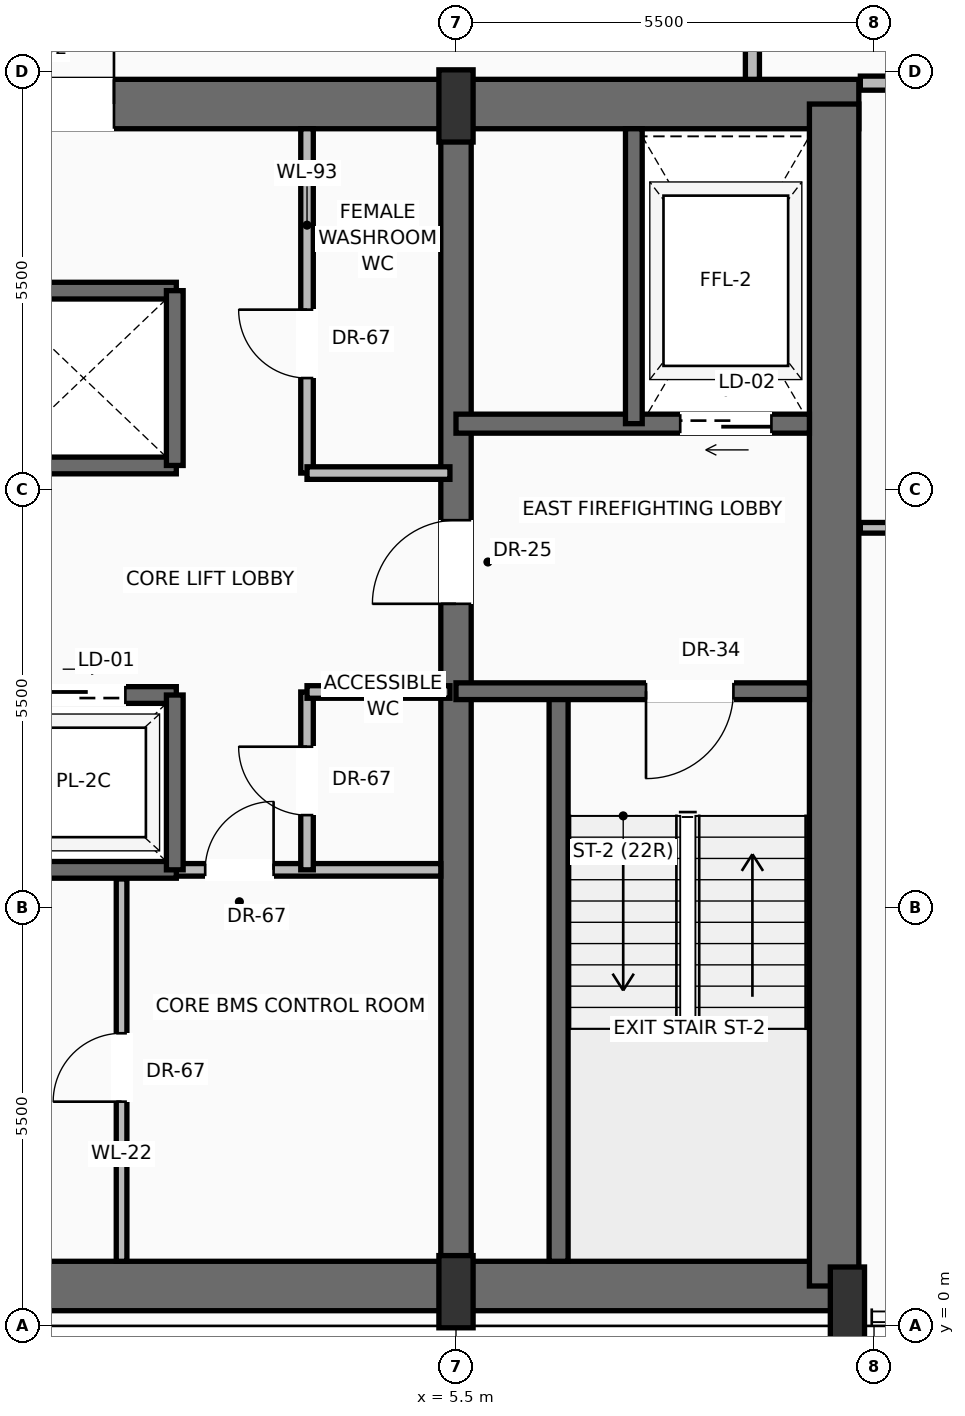
"""IFC4 building model, lengths in metres.
Left out: names, types, materials, properties, quantities, classifications, styles, units other than length and angle.
Written with IfcOpenShell. Run it as: python <this file> out.ifc"""

import sys

from ifc_helpers import new_model, si_unit, direction, frame, frame_2d, origin, origin_2d, place, context, subcontext, project, spatial, rectangle, extrude, source, transform, mapped, element, fill, save


model = new_model("IFC4")
c1 = context("Model", 3, precision=1e-05, world=origin(), true_north=direction((0.0, 1.0)))
c2 = subcontext(c1, "Body", "Model", "MODEL_VIEW")
j1 = project(units=[si_unit("LENGTHUNIT", "METRE"), si_unit("PLANEANGLEUNIT", "RADIAN")], contexts=[c1])
p1 = place(None, origin())
s1 = spatial("IfcSite", under=j1, at=p1, CompositionType="ELEMENT")
p2 = place(p1, origin())
s2 = spatial("IfcBuilding", under=s1, at=p2, CompositionType="ELEMENT")
p3 = place(p2, frame((0.0, 0.0, 147.8)))
s3 = spatial("IfcBuildingStorey", under=s2, at=p3, CompositionType="ELEMENT", Elevation=147.8)
p4 = place(p3, frame((-10.65, 0.525, 0.0), z_axis=(0.0, 0.0, 1.0), x_axis=(1.0, 0.0, 0.0)))
e1 = element("IfcWall", 1, at=p4, inside=s3, PredefinedType="SHEAR", context=c2, shape_type="SweptSolid", body=[
    extrude(rectangle(XDim=21.3, YDim=0.65, at=frame_2d((10.65, 0.0))), origin(), (0.0, 0.0, 1.0), 3.47),
])
p5 = place(p3, frame((-10.8, 16.075, 0.0), z_axis=(0.0, 0.0, 1.0), x_axis=(1.0, 0.0, 0.0)))
e2 = element("IfcWall", 2, at=p5, inside=s3, PredefinedType="SHEAR", context=c2, shape_type="SweptSolid", body=[
    extrude(rectangle(XDim=21.6, YDim=0.65, at=frame_2d((10.8, 0.0))), origin(), (0.0, 0.0, 1.0), 3.47),
])
p6 = place(p5, frame((3.37, 0.0, 0.0)))
e3 = element("IfcOpeningElement", 3, at=p6, cuts=e2, PredefinedType="OPENING", context=c2, shape_type="SweptSolid", body=[
    extrude(rectangle(XDim=1.3, YDim=2.3, at=frame_2d((0.65, 1.15))), frame((0.0, 0.335, 0.0), z_axis=(0.0, -1.0, 0.0), x_axis=(1.0, 0.0, 0.0)), (0.0, 0.0, 1.0), 0.67),
])
p7 = place(p5, frame((9.8, 0.0, 0.0)))
e4 = element("IfcOpeningElement", 4, at=p7, cuts=e2, PredefinedType="OPENING", context=c2, shape_type="SweptSolid", body=[
    extrude(rectangle(XDim=2.0, YDim=2.4, at=frame_2d((1.0, 1.2))), frame((0.0, 0.335, 0.0), z_axis=(0.0, -1.0, 0.0), x_axis=(1.0, 0.0, 0.0)), (0.0, 0.0, 1.0), 0.67),
])
p8 = place(p3, frame((10.475, 0.525, 0.0), z_axis=(0.0, 0.0, 1.0), x_axis=(0.0, 1.0, 0.0)))
e5 = element("IfcWall", 5, at=p8, inside=s3, PredefinedType="SHEAR", context=c2, shape_type="SweptSolid", body=[
    extrude(rectangle(XDim=15.55, YDim=0.65, at=frame_2d((7.775, 0.0))), origin(), (0.0, 0.0, 1.0), 3.47),
])
p9 = place(p3, frame((5.5, 0.525, 0.0), z_axis=(0.0, 0.0, 1.0), x_axis=(0.0, 1.0, 0.0)))
e6 = element("IfcWall", 6, at=p9, inside=s3, PredefinedType="SHEAR", context=c2, shape_type="SweptSolid", body=[
    extrude(rectangle(XDim=15.55, YDim=0.4, at=frame_2d((7.775, 0.0))), origin(), (0.0, 0.0, 1.0), 3.47),
])
p10 = place(p9, frame((8.975, 0.0, 0.0)))
e7 = element("IfcOpeningElement", 7, at=p10, cuts=e6, PredefinedType="OPENING", context=c2, shape_type="SweptSolid", body=[
    extrude(rectangle(XDim=1.1, YDim=2.2, at=frame_2d((0.55, 1.1))), frame((0.0, 0.21, 0.0), z_axis=(0.0, -1.0, 0.0), x_axis=(1.0, 0.0, 0.0)), (0.0, 0.0, 1.0), 0.42),
])
m1 = source(origin(), c2, "Body", "SweptSolid", [
    extrude(rectangle(XDim=0.45, YDim=0.95, at=origin_2d()), origin(), (0.0, 0.0, 1.0), 3.7),
])
for number, where, z_axis, x_axis in (
    (8, (5.5, 0.45, 0.0), (0.0, 0.0, 1.0), (1.0, 0.0, 0.0)),
    (9, (10.65, 0.3, 0.0), (0.0, 0.0, 1.0), (1.0, 0.0, 0.0)),
    (10, (5.5, 16.05, 0.0), (0.0, 0.0, 1.0), (1.0, 0.0, 0.0)),
):
    element("IfcColumn", number, at=place(p3, frame(where, z_axis=z_axis, x_axis=x_axis)), inside=s3, PredefinedType="PILASTER", context=c2, shape_type="MappedRepresentation", body=[
        mapped(m1, transform((0.0, 0.0, 0.0), scale=1.0)),
    ])
p11 = place(p3, frame((6.85, 0.85, 0.0), z_axis=(0.0, 0.0, 1.0), x_axis=(0.0, 1.0, 0.0)))
e11 = element("IfcWall", 11, at=p11, inside=s3, PredefinedType="SOLIDWALL", context=c2, shape_type="SweptSolid", body=[
    extrude(rectangle(XDim=7.5, YDim=0.25, at=frame_2d((3.75, 0.0))), origin(), (0.0, 0.0, 1.0), 3.47),
])
p12 = place(p3, frame((10.15, 8.35, 0.0), z_axis=(0.0, 0.0, 1.0), x_axis=(-1.0, 0.0, 0.0)))
e12 = element("IfcWall", 12, at=p12, inside=s3, PredefinedType="SOLIDWALL", context=c2, shape_type="SweptSolid", body=[
    extrude(rectangle(XDim=4.65, YDim=0.22, at=frame_2d((2.325, 0.0))), origin(), (0.0, 0.0, 1.0), 3.47),
])
p13 = place(p12, frame((1.0, 0.0, 0.0)))
e13 = element("IfcOpeningElement", 13, at=p13, cuts=e12, PredefinedType="OPENING", context=c2, shape_type="SweptSolid", body=[
    extrude(rectangle(XDim=1.15, YDim=2.2, at=frame_2d((0.575, 1.1))), frame((0.0, 0.12, 0.0), z_axis=(0.0, -1.0, 0.0), x_axis=(1.0, 0.0, 0.0)), (0.0, 0.0, 1.0), 0.24),
])
p14 = place(p3, frame((10.15, 11.87, 0.0), z_axis=(0.0, 0.0, 1.0), x_axis=(-1.0, 0.0, 0.0)))
e14 = element("IfcWall", 14, at=p14, inside=s3, PredefinedType="SOLIDWALL", context=c2, shape_type="SweptSolid", body=[
    extrude(rectangle(XDim=4.65, YDim=0.25, at=frame_2d((2.325, 0.0))), origin(), (0.0, 0.0, 1.0), 3.47),
])
p15 = place(p14, frame((0.5, 0.0, 0.0)))
e15 = element("IfcOpeningElement", 15, at=p15, cuts=e14, PredefinedType="OPENING", context=c2, shape_type="SweptSolid", body=[
    extrude(rectangle(XDim=1.2, YDim=2.25, at=frame_2d((0.6, 1.125))), frame((0.0, 0.135, 0.0), z_axis=(0.0, -1.0, 0.0), x_axis=(1.0, 0.0, 0.0)), (0.0, 0.0, 1.0), 0.27),
])
p16 = place(p3, frame((7.84, 11.87, 0.0), z_axis=(0.0, 0.0, 1.0), x_axis=(0.0, 1.0, 0.0)))
e16 = element("IfcWall", 16, at=p16, inside=s3, PredefinedType="SOLIDWALL", context=c2, shape_type="SweptSolid", body=[
    extrude(rectangle(XDim=3.88, YDim=0.22, at=frame_2d((1.94, 0.0))), origin(), (0.0, 0.0, 1.0), 3.47),
])
p17 = place(p3, frame((1.82, 6.0, 0.0), z_axis=(0.0, 0.0, 1.0), x_axis=(1.0, 0.0, 0.0)))
e17 = element("IfcWall", 17, at=p17, inside=s3, PredefinedType="PARTITIONING", context=c2, shape_type="SweptSolid", body=[
    extrude(rectangle(XDim=3.48, YDim=0.165, at=frame_2d((1.74, 0.0))), origin(), (0.0, 0.0, 1.0), 3.462),
])
p18 = place(p17, frame((0.38, 0.0, 0.0)))
e18 = element("IfcOpeningElement", 18, at=p18, cuts=e17, PredefinedType="OPENING", context=c2, shape_type="SweptSolid", body=[
    extrude(rectangle(XDim=0.9, YDim=2.1, at=frame_2d((0.45, 1.05))), frame((0.0, 0.093, 0.0), z_axis=(0.0, -1.0, 0.0), x_axis=(1.0, 0.0, 0.0)), (0.0, 0.0, 1.0), 0.185),
])
p19 = place(p3, frame((1.1, 0.85, 0.0), z_axis=(0.0, 0.0, 1.0), x_axis=(0.0, 1.0, 0.0)))
e19 = element("IfcWall", 19, at=p19, inside=s3, PredefinedType="PARTITIONING", context=c2, shape_type="SweptSolid", body=[
    extrude(rectangle(XDim=5.03, YDim=0.14, at=frame_2d((2.515, 0.0))), origin(), (0.0, 0.0, 1.0), 3.462),
])
p20 = place(p19, frame((2.1, 0.0, 0.0)))
e20 = element("IfcOpeningElement", 20, at=p20, cuts=e19, PredefinedType="OPENING", context=c2, shape_type="SweptSolid", body=[
    extrude(rectangle(XDim=0.9, YDim=2.1, at=frame_2d((0.45, 1.05))), frame((0.0, 0.08, 0.0), z_axis=(0.0, -1.0, 0.0), x_axis=(1.0, 0.0, 0.0)), (0.0, 0.0, 1.0), 0.16),
])
p21 = place(p3, frame((3.54, 6.0, 0.0), z_axis=(0.0, 0.0, 1.0), x_axis=(0.0, 1.0, 0.0)))
e21 = element("IfcWall", 21, at=p21, inside=s3, PredefinedType="PARTITIONING", context=c2, shape_type="SweptSolid", body=[
    extrude(rectangle(XDim=2.34, YDim=0.165, at=frame_2d((1.17, 0.0))), origin(), (0.0, 0.0, 1.0), 3.462),
])
p22 = place(p21, frame((0.72, 0.0, 0.0)))
e22 = element("IfcOpeningElement", 22, at=p22, cuts=e21, PredefinedType="OPENING", context=c2, shape_type="SweptSolid", body=[
    extrude(rectangle(XDim=0.9, YDim=2.1, at=frame_2d((0.45, 1.05))), frame((0.0, 0.093, 0.0), z_axis=(0.0, -1.0, 0.0), x_axis=(1.0, 0.0, 0.0)), (0.0, 0.0, 1.0), 0.185),
])
p23 = place(p3, frame((3.54, 8.34, 0.0), z_axis=(0.0, 0.0, 1.0), x_axis=(1.0, 0.0, 0.0)))
e23 = element("IfcWall", 23, at=p23, inside=s3, PredefinedType="PARTITIONING", context=c2, shape_type="SweptSolid", body=[
    extrude(rectangle(XDim=1.88, YDim=0.165, at=frame_2d((0.94, 0.0))), origin(), (0.0, 0.0, 1.0), 3.462),
])
p24 = place(p3, frame((-5.5, 6.0, 0.0), z_axis=(0.0, 0.0, 1.0), x_axis=(1.0, 0.0, 0.0)))
e24 = element("IfcWall", 24, at=p24, inside=s3, PredefinedType="SOLIDWALL", context=c2, shape_type="SweptSolid", body=[
    extrude(rectangle(XDim=7.32, YDim=0.22, at=frame_2d((3.66, 0.0))), origin(), (0.0, 0.0, 1.0), 3.47),
])
p25 = place(p3, frame((-5.5, 8.3, 0.0), z_axis=(0.0, 0.0, 1.0), x_axis=(1.0, 0.0, 0.0)))
e25 = element("IfcWall", 25, at=p25, inside=s3, PredefinedType="SOLIDWALL", context=c2, shape_type="SweptSolid", body=[
    extrude(rectangle(XDim=7.32, YDim=0.22, at=frame_2d((3.66, 0.0))), origin(), (0.0, 0.0, 1.0), 3.47),
])
p26 = place(p25, frame((0.75, 0.0, 0.0)))
e26 = element("IfcOpeningElement", 26, at=p26, cuts=e25, PredefinedType="OPENING", context=c2, shape_type="SweptSolid", body=[
    extrude(rectangle(XDim=1.1, YDim=2.2, at=frame_2d((0.55, 1.1))), frame((0.0, 0.12, 0.0), z_axis=(0.0, -1.0, 0.0), x_axis=(1.0, 0.0, 0.0)), (0.0, 0.0, 1.0), 0.24),
])
p27 = place(p25, frame((3.15, 0.0, 0.0)))
e27 = element("IfcOpeningElement", 27, at=p27, cuts=e25, PredefinedType="OPENING", context=c2, shape_type="SweptSolid", body=[
    extrude(rectangle(XDim=1.1, YDim=2.2, at=frame_2d((0.55, 1.1))), frame((0.0, 0.12, 0.0), z_axis=(0.0, -1.0, 0.0), x_axis=(1.0, 0.0, 0.0)), (0.0, 0.0, 1.0), 0.24),
])
p28 = place(p25, frame((5.55, 0.0, 0.0)))
e28 = element("IfcOpeningElement", 28, at=p28, cuts=e25, PredefinedType="OPENING", context=c2, shape_type="SweptSolid", body=[
    extrude(rectangle(XDim=1.1, YDim=2.2, at=frame_2d((0.55, 1.1))), frame((0.0, 0.12, 0.0), z_axis=(0.0, -1.0, 0.0), x_axis=(1.0, 0.0, 0.0)), (0.0, 0.0, 1.0), 0.24),
])
p29 = place(p3, frame((1.8, 6.0, 0.0), z_axis=(0.0, 0.0, 1.0), x_axis=(0.0, 1.0, 0.0)))
e29 = element("IfcWall", 29, at=p29, inside=s3, PredefinedType="SOLIDWALL", context=c2, shape_type="SweptSolid", body=[
    extrude(rectangle(XDim=2.3, YDim=0.22, at=frame_2d((1.15, 0.0))), origin(), (0.0, 0.0, 1.0), 3.47),
])
for number, where, z_axis, x_axis in (
    (30, (-5.5, 11.32, 0.0), (0.0, 0.0, 1.0), (1.0, 0.0, 0.0)),
    (31, (-5.5, 13.62, 0.0), (0.0, 0.0, 1.0), (1.0, 0.0, 0.0)),
):
    element("IfcWall", number, at=place(p3, frame(where, z_axis=z_axis, x_axis=x_axis)), inside=s3, PredefinedType="SOLIDWALL", context=c2, shape_type="SweptSolid", body=[
        extrude(rectangle(XDim=7.32, YDim=0.22, at=frame_2d((3.66, 0.0))), origin(), (0.0, 0.0, 1.0), 3.47),
    ])
p30 = place(p3, frame((1.8, 11.32, 0.0), z_axis=(0.0, 0.0, 1.0), x_axis=(0.0, 1.0, 0.0)))
e32 = element("IfcWall", 32, at=p30, inside=s3, PredefinedType="SOLIDWALL", context=c2, shape_type="SweptSolid", body=[
    extrude(rectangle(XDim=2.3, YDim=0.22, at=frame_2d((1.15, 0.0))), origin(), (0.0, 0.0, 1.0), 3.47),
])
p31 = place(p3, frame((3.54, 11.22, 0.0), z_axis=(0.0, 0.0, 1.0), x_axis=(0.0, 1.0, 0.0)))
e33 = element("IfcWall", 33, at=p31, inside=s3, PredefinedType="PARTITIONING", context=c2, shape_type="SweptSolid", body=[
    extrude(rectangle(XDim=4.53, YDim=0.165, at=frame_2d((2.265, 0.0))), origin(), (0.0, 0.0, 1.0), 3.462),
])
p32 = place(p31, frame((1.25, 0.0, 0.0)))
e34 = element("IfcOpeningElement", 34, at=p32, cuts=e33, PredefinedType="OPENING", context=c2, shape_type="SweptSolid", body=[
    extrude(rectangle(XDim=0.9, YDim=2.1, at=frame_2d((0.45, 1.05))), frame((0.0, 0.093, 0.0), z_axis=(0.0, -1.0, 0.0), x_axis=(1.0, 0.0, 0.0)), (0.0, 0.0, 1.0), 0.185),
])
p33 = place(p3, frame((3.54, 11.22, 0.0), z_axis=(0.0, 0.0, 1.0), x_axis=(1.0, 0.0, 0.0)))
e35 = element("IfcWall", 35, at=p33, inside=s3, PredefinedType="PARTITIONING", context=c2, shape_type="SweptSolid", body=[
    extrude(rectangle(XDim=1.88, YDim=0.165, at=frame_2d((0.94, 0.0))), origin(), (0.0, 0.0, 1.0), 3.462),
])
p34 = place(p3, frame((9.4, 16.4, 0.0), z_axis=(0.0, 0.0, 1.0), x_axis=(0.0, 1.0, 0.0)))
e36 = element("IfcWall", 36, at=p34, inside=s3, PredefinedType="PARTITIONING", context=c2, shape_type="SweptSolid", body=[
    extrude(rectangle(XDim=8.8, YDim=0.185, at=frame_2d((4.4, 0.0))), origin(), (0.0, 0.0, 1.0), 2.846),
])
p35 = place(p34, frame((4.331, 0.0, 0.0)))
e37 = element("IfcOpeningElement", 37, at=p35, cuts=e36, PredefinedType="OPENING", context=c2, shape_type="SweptSolid", body=[
    extrude(rectangle(XDim=0.95, YDim=2.2, at=frame_2d((0.475, 1.1))), frame((0.0, 0.103, 0.0), z_axis=(0.0, -1.0, 0.0), x_axis=(1.0, 0.0, 0.0)), (0.0, 0.0, 1.0), 0.205),
])
p36 = place(p3, frame((10.82, 16.35, 0.0), z_axis=(0.0, 0.0, 1.0), x_axis=(1.0, 0.0, 0.0)))
e38 = element("IfcWall", 38, at=p36, inside=s3, PredefinedType="PARTITIONING", context=c2, shape_type="SweptSolid", body=[
    extrude(rectangle(XDim=10.813, YDim=0.185, at=frame_2d((5.406, 0.0))), origin(), (0.0, 0.0, 1.0), 3.462),
])
p37 = place(p36, frame((3.412, 0.0, 0.0)))
e39 = element("IfcOpeningElement", 39, at=p37, cuts=e38, PredefinedType="OPENING", context=c2, shape_type="SweptSolid", body=[
    extrude(rectangle(XDim=0.95, YDim=2.2, at=frame_2d((0.475, 1.1))), frame((0.0, 0.103, 0.0), z_axis=(0.0, -1.0, 0.0), x_axis=(1.0, 0.0, 0.0)), (0.0, 0.0, 1.0), 0.205),
])
p38 = place(p3, frame((10.82, 10.5, 0.0), z_axis=(0.0, 0.0, 1.0), x_axis=(1.0, 0.0, 0.0)))
e40 = element("IfcWall", 40, at=p38, inside=s3, PredefinedType="PARTITIONING", context=c2, shape_type="SweptSolid", body=[
    extrude(rectangle(XDim=14.536, YDim=0.14, at=frame_2d((7.268, 0.0))), origin(), (0.0, 0.0, 1.0), 3.462),
])
p39 = place(p38, frame((6.785, 0.0, 0.0)))
e41 = element("IfcOpeningElement", 41, at=p39, cuts=e40, PredefinedType="OPENING", context=c2, shape_type="SweptSolid", body=[
    extrude(rectangle(XDim=0.95, YDim=2.2, at=frame_2d((0.475, 1.1))), frame((0.0, 0.08, 0.0), z_axis=(0.0, -1.0, 0.0), x_axis=(1.0, 0.0, 0.0)), (0.0, 0.0, 1.0), 0.16),
])
m2 = source(origin(), c2, "Body", "SweptSolid", [
    extrude(rectangle(XDim=1.15, YDim=2.2, at=frame_2d((0.575, 1.1))), frame((0.0, 0.025, 0.0), z_axis=(0.0, -1.0, 0.0), x_axis=(1.0, 0.0, 0.0)), (0.0, 0.0, 1.0), 0.05),
])
p40 = place(p13, origin())
e42 = element("IfcDoor", 42, at=p40, inside=s3, OperationType="SINGLE_SWING_RIGHT", PredefinedType="DOOR", context=c2, shape_type="MappedRepresentation", body=[
    mapped(m2, transform((0.0, 0.0, 0.0), scale=1.0)),
])
fill(e13, e42)
m3 = source(origin(), c2, "Body", "SweptSolid", [
    extrude(rectangle(XDim=1.1, YDim=2.2, at=frame_2d((0.55, 1.1))), frame((0.0, 0.025, 0.0), z_axis=(0.0, -1.0, 0.0), x_axis=(1.0, 0.0, 0.0)), (0.0, 0.0, 1.0), 0.05),
])
p41 = place(p10, origin())
e43 = element("IfcDoor", 43, at=p41, inside=s3, OperationType="SINGLE_SWING_LEFT", PredefinedType="DOOR", context=c2, shape_type="MappedRepresentation", body=[
    mapped(m3, transform((0.0, 0.0, 0.0), scale=1.0)),
])
fill(e7, e43)
m4 = source(origin(), c2, "Body", "SweptSolid", [
    extrude(rectangle(XDim=1.2, YDim=2.25, at=frame_2d((0.6, 1.125))), frame((0.0, 0.025, 0.0), z_axis=(0.0, -1.0, 0.0), x_axis=(1.0, 0.0, 0.0)), (0.0, 0.0, 1.0), 0.05),
])
p42 = place(p15, origin())
e44 = element("IfcDoor", 44, at=p42, inside=s3, OperationType="SLIDING_TO_RIGHT", PredefinedType="DOOR", context=c2, shape_type="MappedRepresentation", body=[
    mapped(m4, transform((0.0, 0.0, 0.0), scale=1.0)),
])
fill(e15, e44)
m5 = source(origin(), c2, "Body", "SweptSolid", [
    extrude(rectangle(XDim=2.0, YDim=2.4, at=frame_2d((1.0, 1.2))), frame((0.0, 0.025, 0.0), z_axis=(0.0, -1.0, 0.0), x_axis=(1.0, 0.0, 0.0)), (0.0, 0.0, 1.0), 0.05),
])
p43 = place(p7, origin())
e45 = element("IfcDoor", 45, at=p43, inside=s3, OperationType="DOUBLE_DOOR_SINGLE_SWING", PredefinedType="DOOR", context=c2, shape_type="MappedRepresentation", body=[
    mapped(m5, transform((0.0, 0.0, 0.0), scale=1.0)),
])
fill(e4, e45)
m6 = source(origin(), c2, "Body", "SweptSolid", [
    extrude(rectangle(XDim=0.9, YDim=2.1, at=frame_2d((0.45, 1.05))), frame((0.0, 0.025, 0.0), z_axis=(0.0, -1.0, 0.0), x_axis=(1.0, 0.0, 0.0)), (0.0, 0.0, 1.0), 0.05),
])
p44 = place(p18, origin())
e46 = element("IfcDoor", 46, at=p44, inside=s3, OperationType="SINGLE_SWING_RIGHT", PredefinedType="DOOR", context=c2, shape_type="MappedRepresentation", body=[
    mapped(m6, transform((0.0, 0.0, 0.0), scale=1.0)),
])
fill(e18, e46)
p45 = place(p20, origin())
e47 = element("IfcDoor", 47, at=p45, inside=s3, OperationType="SINGLE_SWING_LEFT", PredefinedType="DOOR", context=c2, shape_type="MappedRepresentation", body=[
    mapped(m6, transform((0.0, 0.0, 0.0), scale=1.0)),
])
fill(e20, e47)
p46 = place(p22, origin())
e48 = element("IfcDoor", 48, at=p46, inside=s3, OperationType="SINGLE_SWING_RIGHT", PredefinedType="DOOR", context=c2, shape_type="MappedRepresentation", body=[
    mapped(m6, transform((0.0, 0.0, 0.0), scale=1.0)),
])
fill(e22, e48)
m7 = source(origin(), c2, "Body", "SweptSolid", [
    extrude(rectangle(XDim=1.1, YDim=2.2, at=frame_2d((0.55, 1.1))), frame((0.0, 0.025, 0.0), z_axis=(0.0, -1.0, 0.0), x_axis=(1.0, 0.0, 0.0)), (0.0, 0.0, 1.0), 0.05),
])
p47 = place(p28, origin())
e49 = element("IfcDoor", 49, at=p47, inside=s3, OperationType="SLIDING_TO_LEFT", PredefinedType="DOOR", context=c2, shape_type="MappedRepresentation", body=[
    mapped(m7, transform((0.0, 0.0, 0.0), scale=1.0)),
])
fill(e28, e49)
p48 = place(p32, origin())
e50 = element("IfcDoor", 50, at=p48, inside=s3, OperationType="SINGLE_SWING_RIGHT", PredefinedType="DOOR", context=c2, shape_type="MappedRepresentation", body=[
    mapped(m6, transform((0.0, 0.0, 0.0), scale=1.0)),
])
fill(e34, e50)
save(model, sys.argv[1])
